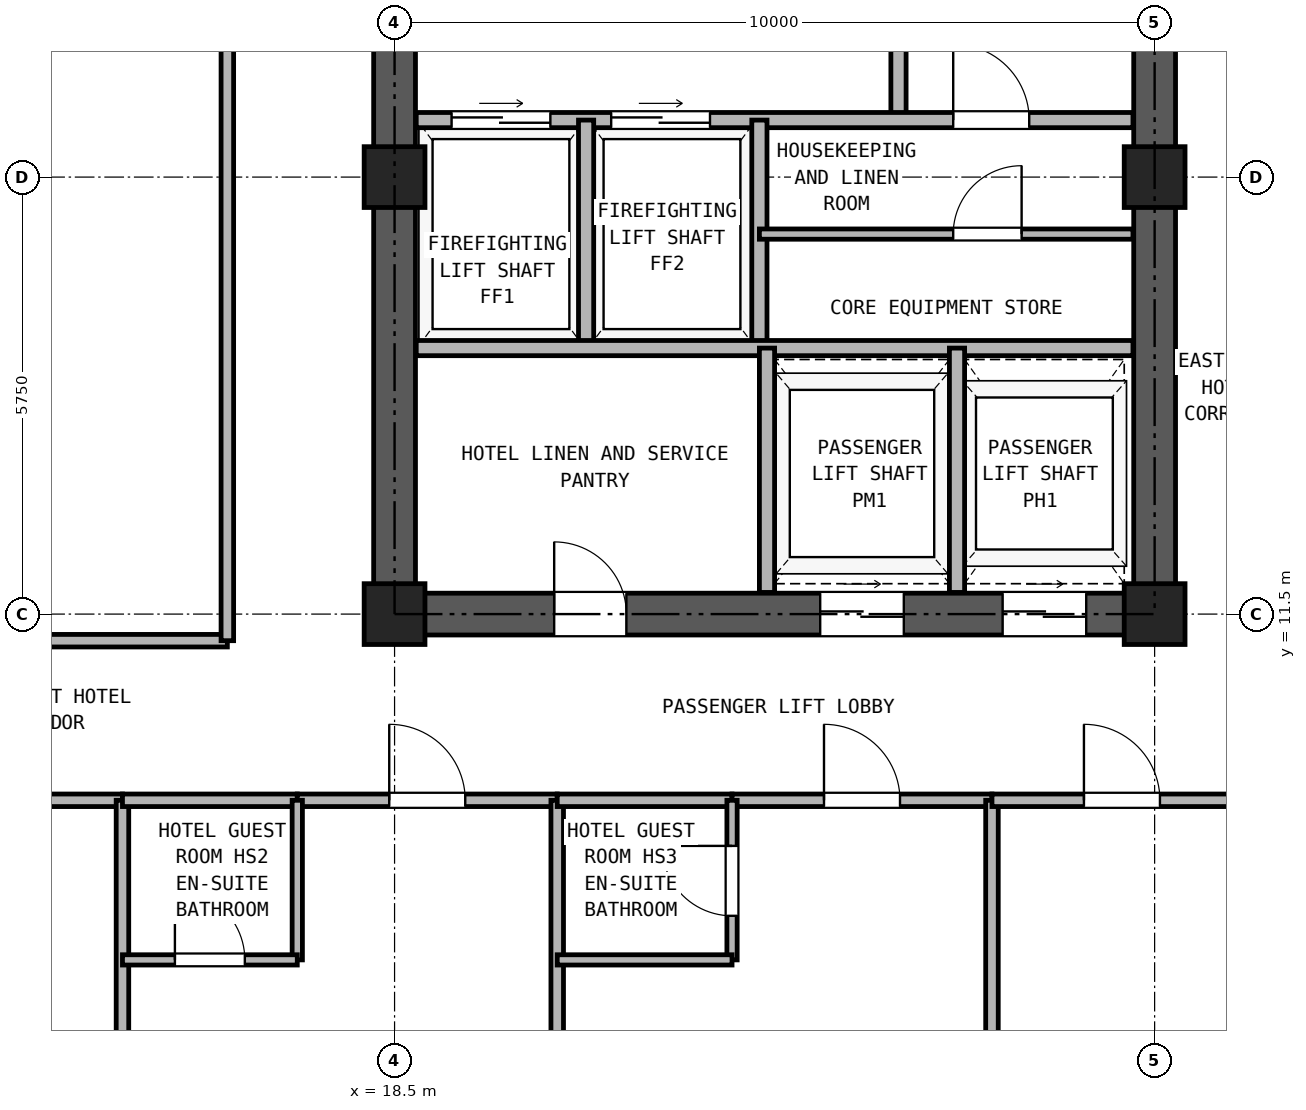
"""IFC4 building model, lengths in metres.
Left out: names, types, materials, properties, quantities, classifications, styles, units other than length and angle.
Written with IfcOpenShell. Run it as: python <this file> out.ifc"""

import sys

from ifc_helpers import new_model, si_unit, direction, frame, frame_2d, origin, origin_2d, place, context, subcontext, project, spatial, rectangle, hollow_rectangle, extrude, source, transform, mapped, element, fill, save


model = new_model("IFC4")
c1 = context("Model", 3, precision=1e-05, world=origin(), true_north=direction((0.0, 1.0)))
c2 = subcontext(c1, "Body", "Model", "MODEL_VIEW")
j1 = project(units=[si_unit("LENGTHUNIT", "METRE"), si_unit("PLANEANGLEUNIT", "RADIAN")], contexts=[c1])
p1 = place(None, origin())
s1 = spatial("IfcSite", under=j1, at=p1, CompositionType="ELEMENT")
p2 = place(p1, origin())
s2 = spatial("IfcBuilding", under=s1, at=p2, CompositionType="ELEMENT")
p3 = place(p2, frame((0.0, 0.0, 102.3)))
s3 = spatial("IfcBuildingStorey", under=s2, at=p3, CompositionType="ELEMENT", Elevation=102.3)
m1 = source(origin(), c2, "Body", "SweptSolid", [
    extrude(hollow_rectangle(XDim=0.8, YDim=0.8, WallThickness=0.045, at=origin_2d()), origin(), (0.0, 0.0, 1.0), 2.95),
])
for number, where, z_axis, x_axis in (
    (1, (18.5, 11.5, 0.0), (0.0, 0.0, 1.0), (1.0, 0.0, 0.0)),
    (2, (18.5, 17.25, 0.0), (0.0, 0.0, 1.0), (1.0, 0.0, 0.0)),
    (3, (28.5, 11.5, 0.0), (0.0, 0.0, 1.0), (1.0, 0.0, 0.0)),
    (4, (28.5, 17.25, 0.0), (0.0, 0.0, 1.0), (1.0, 0.0, 0.0)),
):
    element("IfcColumn", number, at=place(p3, frame(where, z_axis=z_axis, x_axis=x_axis)), inside=s3, PredefinedType="COLUMN", context=c2, shape_type="MappedRepresentation", body=[
        mapped(m1, transform((0.0, 0.0, 0.0), x_axis=(1.0, 0.0, 0.0), y_axis=(0.0, 1.0, 0.0), z_axis=(0.0, 0.0, 1.0), scale=1.0)),
    ])
p4 = place(p3, frame((18.225, 11.5, 0.0), z_axis=(0.0, 0.0, 1.0), x_axis=(1.0, 0.0, 0.0)))
e5 = element("IfcWall", 5, at=p4, inside=s3, PredefinedType="SHEAR", context=c2, shape_type="SweptSolid", body=[
    extrude(rectangle(XDim=10.55, YDim=0.55, at=frame_2d((5.275, 0.0))), origin(), (0.0, 0.0, 1.0), 2.95),
])
p5 = place(p4, frame((2.375, 0.0, 0.0)))
e6 = element("IfcOpeningElement", 6, at=p5, cuts=e5, PredefinedType="OPENING", context=c2, shape_type="SweptSolid", body=[
    extrude(rectangle(XDim=0.95, YDim=2.15, at=frame_2d((0.475, 1.075))), frame((0.0, 0.285, 0.0), z_axis=(0.0, -1.0, 0.0), x_axis=(1.0, 0.0, 0.0)), (0.0, 0.0, 1.0), 0.57),
])
p6 = place(p4, frame((5.875, 0.0, 0.0)))
e7 = element("IfcOpeningElement", 7, at=p6, cuts=e5, PredefinedType="OPENING", context=c2, shape_type="SweptSolid", body=[
    extrude(rectangle(XDim=1.1, YDim=2.25, at=frame_2d((0.55, 1.125))), frame((0.0, 0.285, 0.0), z_axis=(0.0, -1.0, 0.0), x_axis=(1.0, 0.0, 0.0)), (0.0, 0.0, 1.0), 0.57),
])
p7 = place(p4, frame((8.275, 0.0, 0.0)))
e8 = element("IfcOpeningElement", 8, at=p7, cuts=e5, PredefinedType="OPENING", context=c2, shape_type="SweptSolid", body=[
    extrude(rectangle(XDim=1.1, YDim=2.25, at=frame_2d((0.55, 1.125))), frame((0.0, 0.285, 0.0), z_axis=(0.0, -1.0, 0.0), x_axis=(1.0, 0.0, 0.0)), (0.0, 0.0, 1.0), 0.57),
])
p8 = place(p3, frame((18.5, 11.775, 0.0), z_axis=(0.0, 0.0, 1.0), x_axis=(0.0, 1.0, 0.0)))
e9 = element("IfcWall", 9, at=p8, inside=s3, PredefinedType="SHEAR", context=c2, shape_type="SweptSolid", body=[
    extrude(rectangle(XDim=16.7, YDim=0.55, at=frame_2d((8.35, 0.0))), origin(), (0.0, 0.0, 1.0), 2.95),
])
p9 = place(p8, frame((7.375, 0.0, 0.0)))
e10 = element("IfcOpeningElement", 10, at=p9, cuts=e9, PredefinedType="OPENING", context=c2, shape_type="SweptSolid", body=[
    extrude(rectangle(XDim=1.15, YDim=2.2, at=frame_2d((0.575, 1.1))), frame((0.0, 0.285, 0.0), z_axis=(0.0, -1.0, 0.0), x_axis=(1.0, 0.0, 0.0)), (0.0, 0.0, 1.0), 0.57),
])
p10 = place(p3, frame((28.5, 11.775, 0.0), z_axis=(0.0, 0.0, 1.0), x_axis=(0.0, 1.0, 0.0)))
e11 = element("IfcWall", 11, at=p10, inside=s3, PredefinedType="SHEAR", context=c2, shape_type="SweptSolid", body=[
    extrude(rectangle(XDim=16.7, YDim=0.55, at=frame_2d((8.35, 0.0))), origin(), (0.0, 0.0, 1.0), 2.95),
])
p11 = place(p10, frame((7.375, 0.0, 0.0)))
e12 = element("IfcOpeningElement", 12, at=p11, cuts=e11, PredefinedType="OPENING", context=c2, shape_type="SweptSolid", body=[
    extrude(rectangle(XDim=1.15, YDim=2.2, at=frame_2d((0.575, 1.1))), frame((0.0, 0.285, 0.0), z_axis=(0.0, -1.0, 0.0), x_axis=(1.0, 0.0, 0.0)), (0.0, 0.0, 1.0), 0.57),
])
p12 = place(p3, frame((25.13, 18.0, 0.0), z_axis=(0.0, 0.0, 1.0), x_axis=(0.0, 1.0, 0.0)))
e13 = element("IfcWall", 13, at=p12, inside=s3, PredefinedType="PARTITIONING", context=c2, shape_type="SweptSolid", body=[
    extrude(rectangle(XDim=3.39, YDim=0.2, at=frame_2d((1.695, 0.0))), origin(), (0.0, 0.0, 1.0), 2.95),
])
p13 = place(p12, frame((1.1, 0.0, 0.0)))
e14 = element("IfcOpeningElement", 14, at=p13, cuts=e13, PredefinedType="OPENING", context=c2, shape_type="SweptSolid", body=[
    extrude(rectangle(XDim=1.15, YDim=2.2, at=frame_2d((0.575, 1.1))), frame((0.0, 0.11, 0.0), z_axis=(0.0, -1.0, 0.0), x_axis=(1.0, 0.0, 0.0)), (0.0, 0.0, 1.0), 0.22),
])
p14 = place(p3, frame((18.785, 18.0, 0.0), z_axis=(0.0, 0.0, 1.0), x_axis=(1.0, 0.0, 0.0)))
e15 = element("IfcWall", 15, at=p14, inside=s3, PredefinedType="PARTITIONING", context=c2, shape_type="SweptSolid", body=[
    extrude(rectangle(XDim=9.43, YDim=0.2, at=frame_2d((4.715, 0.0))), origin(), (0.0, 0.0, 1.0), 2.95),
])
p15 = place(p14, frame((0.465, 0.0, 0.0)))
e16 = element("IfcOpeningElement", 16, at=p15, cuts=e15, PredefinedType="OPENING", context=c2, shape_type="SweptSolid", body=[
    extrude(rectangle(XDim=1.3, YDim=2.3, at=frame_2d((0.65, 1.15))), frame((0.0, 0.11, 0.0), z_axis=(0.0, -1.0, 0.0), x_axis=(1.0, 0.0, 0.0)), (0.0, 0.0, 1.0), 0.22),
])
p16 = place(p14, frame((2.565, 0.0, 0.0)))
e17 = element("IfcOpeningElement", 17, at=p16, cuts=e15, PredefinedType="OPENING", context=c2, shape_type="SweptSolid", body=[
    extrude(rectangle(XDim=1.3, YDim=2.3, at=frame_2d((0.65, 1.15))), frame((0.0, 0.11, 0.0), z_axis=(0.0, -1.0, 0.0), x_axis=(1.0, 0.0, 0.0)), (0.0, 0.0, 1.0), 0.22),
])
p17 = place(p14, frame((7.065, 0.0, 0.0)))
e18 = element("IfcOpeningElement", 18, at=p17, cuts=e15, PredefinedType="OPENING", context=c2, shape_type="SweptSolid", body=[
    extrude(rectangle(XDim=1.0, YDim=2.15, at=frame_2d((0.5, 1.075))), frame((0.0, 0.11, 0.0), z_axis=(0.0, -1.0, 0.0), x_axis=(1.0, 0.0, 0.0)), (0.0, 0.0, 1.0), 0.22),
])
for number, where, z_axis, x_axis in (
    (19, (21.02, 15.0, 0.0), (0.0, 0.0, 1.0), (0.0, 1.0, 0.0)),
    (20, (23.3, 15.0, 0.0), (0.0, 0.0, 1.0), (0.0, 1.0, 0.0)),
):
    element("IfcWall", number, at=place(p3, frame(where, z_axis=z_axis, x_axis=x_axis)), inside=s3, PredefinedType="PARTITIONING", context=c2, shape_type="SweptSolid", body=[
        extrude(rectangle(XDim=3.0, YDim=0.2, at=frame_2d((1.5, 0.0))), origin(), (0.0, 0.0, 1.0), 2.95),
    ])
p18 = place(p3, frame((18.785, 15.0, 0.0), z_axis=(0.0, 0.0, 1.0), x_axis=(1.0, 0.0, 0.0)))
e21 = element("IfcWall", 21, at=p18, inside=s3, PredefinedType="PARTITIONING", context=c2, shape_type="SweptSolid", body=[
    extrude(rectangle(XDim=9.43, YDim=0.2, at=frame_2d((4.715, 0.0))), origin(), (0.0, 0.0, 1.0), 2.95),
])
p19 = place(p3, frame((23.3, 16.5, 0.0), z_axis=(0.0, 0.0, 1.0), x_axis=(1.0, 0.0, 0.0)))
e22 = element("IfcWall", 22, at=p19, inside=s3, PredefinedType="PARTITIONING", context=c2, shape_type="SweptSolid", body=[
    extrude(rectangle(XDim=4.915, YDim=0.135, at=frame_2d((2.458, 0.0))), origin(), (0.0, 0.0, 1.0), 2.95),
])
p20 = place(p19, frame((2.55, 0.0, 0.0)))
e23 = element("IfcOpeningElement", 23, at=p20, cuts=e22, PredefinedType="OPENING", context=c2, shape_type="SweptSolid", body=[
    extrude(rectangle(XDim=0.9, YDim=2.05, at=frame_2d((0.45, 1.025))), frame((0.0, 0.077, 0.0), z_axis=(0.0, -1.0, 0.0), x_axis=(1.0, 0.0, 0.0)), (0.0, 0.0, 1.0), 0.155),
])
for number, where, z_axis, x_axis in (
    (24, (23.4, 11.785, 0.0), (0.0, 0.0, 1.0), (0.0, 1.0, 0.0)),
    (25, (25.9, 11.785, 0.0), (0.0, 0.0, 1.0), (0.0, 1.0, 0.0)),
):
    element("IfcWall", number, at=place(p3, frame(where, z_axis=z_axis, x_axis=x_axis)), inside=s3, PredefinedType="PARTITIONING", context=c2, shape_type="SweptSolid", body=[
        extrude(rectangle(XDim=3.215, YDim=0.2, at=frame_2d((1.607, 0.0))), origin(), (0.0, 0.0, 1.0), 2.95),
    ])
p21 = place(p3, frame((9.2, 11.15, 0.0), z_axis=(0.0, 0.0, 1.0), x_axis=(1.0, 0.0, 0.0)))
e26 = element("IfcWall", 26, at=p21, inside=s3, PredefinedType="PARTITIONING", context=c2, shape_type="SweptSolid", body=[
    extrude(rectangle(XDim=7.1, YDim=0.165, at=frame_2d((3.55, 0.0))), origin(), (0.0, 0.0, 1.0), 2.95),
])
p22 = place(p3, frame((16.3, 11.15, 0.0), z_axis=(0.0, 0.0, 1.0), x_axis=(0.0, 1.0, 0.0)))
e27 = element("IfcWall", 27, at=p22, inside=s3, PredefinedType="PARTITIONING", context=c2, shape_type="SweptSolid", body=[
    extrude(rectangle(XDim=18.6, YDim=0.165, at=frame_2d((9.3, 0.0))), origin(), (0.0, 0.0, 1.0), 2.95),
])
p23 = place(p22, frame((8.8, 0.0, 0.0)))
e28 = element("IfcOpeningElement", 28, at=p23, cuts=e27, PredefinedType="OPENING", context=c2, shape_type="SweptSolid", body=[
    extrude(rectangle(XDim=0.95, YDim=2.15, at=frame_2d((0.475, 1.075))), frame((0.0, 0.093, 0.0), z_axis=(0.0, -1.0, 0.0), x_axis=(1.0, 0.0, 0.0)), (0.0, 0.0, 1.0), 0.185),
])
p24 = place(p3, frame((11.5, 9.05, 0.0), z_axis=(0.0, 0.0, 1.0), x_axis=(1.0, 0.0, 0.0)))
e29 = element("IfcWall", 29, at=p24, inside=s3, PredefinedType="PARTITIONING", context=c2, shape_type="SweptSolid", body=[
    extrude(rectangle(XDim=3.42, YDim=0.165, at=frame_2d((1.71, 0.0))), origin(), (0.0, 0.0, 1.0), 2.95),
])
p25 = place(p24, frame((1.21, 0.0, 0.0)))
e30 = element("IfcOpeningElement", 30, at=p25, cuts=e29, PredefinedType="OPENING", context=c2, shape_type="SweptSolid", body=[
    extrude(rectangle(XDim=1.0, YDim=2.15, at=frame_2d((0.5, 1.075))), frame((0.0, 0.093, 0.0), z_axis=(0.0, -1.0, 0.0), x_axis=(1.0, 0.0, 0.0)), (0.0, 0.0, 1.0), 0.185),
])
p26 = place(p3, frame((14.92, 0.16, 0.0), z_axis=(0.0, 0.0, 1.0), x_axis=(0.0, 1.0, 0.0)))
e31 = element("IfcWall", 31, at=p26, inside=s3, PredefinedType="PARTITIONING", context=c2, shape_type="SweptSolid", body=[
    extrude(rectangle(XDim=8.89, YDim=0.165, at=frame_2d((4.445, 0.0))), origin(), (0.0, 0.0, 1.0), 2.95),
])
p27 = place(p3, frame((14.92, 9.05, 0.0), z_axis=(0.0, 0.0, 1.0), x_axis=(1.0, 0.0, 0.0)))
e32 = element("IfcWall", 32, at=p27, inside=s3, PredefinedType="PARTITIONING", context=c2, shape_type="SweptSolid", body=[
    extrude(rectangle(XDim=2.3, YDim=0.165, at=frame_2d((1.15, 0.0))), origin(), (0.0, 0.0, 1.0), 2.95),
])
p28 = place(p3, frame((17.22, 9.05, 0.0), z_axis=(0.0, 0.0, 1.0), x_axis=(1.0, 0.0, 0.0)))
e33 = element("IfcWall", 33, at=p28, inside=s3, PredefinedType="PARTITIONING", context=c2, shape_type="SweptSolid", body=[
    extrude(rectangle(XDim=3.42, YDim=0.165, at=frame_2d((1.71, 0.0))), origin(), (0.0, 0.0, 1.0), 2.95),
])
p29 = place(p28, frame((1.21, 0.0, 0.0)))
e34 = element("IfcOpeningElement", 34, at=p29, cuts=e33, PredefinedType="OPENING", context=c2, shape_type="SweptSolid", body=[
    extrude(rectangle(XDim=1.0, YDim=2.15, at=frame_2d((0.5, 1.075))), frame((0.0, 0.093, 0.0), z_axis=(0.0, -1.0, 0.0), x_axis=(1.0, 0.0, 0.0)), (0.0, 0.0, 1.0), 0.185),
])
p30 = place(p3, frame((17.22, 6.95, 0.0), z_axis=(0.0, 0.0, 1.0), x_axis=(0.0, 1.0, 0.0)))
e35 = element("IfcWall", 35, at=p30, inside=s3, PredefinedType="PARTITIONING", context=c2, shape_type="SweptSolid", body=[
    extrude(rectangle(XDim=2.1, YDim=0.135, at=frame_2d((1.05, 0.0))), origin(), (0.0, 0.0, 1.0), 2.95),
])
p31 = place(p3, frame((14.92, 6.95, 0.0), z_axis=(0.0, 0.0, 1.0), x_axis=(1.0, 0.0, 0.0)))
e36 = element("IfcWall", 36, at=p31, inside=s3, PredefinedType="PARTITIONING", context=c2, shape_type="SweptSolid", body=[
    extrude(rectangle(XDim=2.3, YDim=0.135, at=frame_2d((1.15, 0.0))), origin(), (0.0, 0.0, 1.0), 2.95),
])
p32 = place(p31, frame((0.69, 0.0, 0.0)))
e37 = element("IfcOpeningElement", 37, at=p32, cuts=e36, PredefinedType="OPENING", context=c2, shape_type="SweptSolid", body=[
    extrude(rectangle(XDim=0.92, YDim=2.1, at=frame_2d((0.46, 1.05))), frame((0.0, 0.077, 0.0), z_axis=(0.0, -1.0, 0.0), x_axis=(1.0, 0.0, 0.0)), (0.0, 0.0, 1.0), 0.155),
])
p33 = place(p3, frame((20.64, 0.16, 0.0), z_axis=(0.0, 0.0, 1.0), x_axis=(0.0, 1.0, 0.0)))
e38 = element("IfcWall", 38, at=p33, inside=s3, PredefinedType="PARTITIONING", context=c2, shape_type="SweptSolid", body=[
    extrude(rectangle(XDim=8.89, YDim=0.165, at=frame_2d((4.445, 0.0))), origin(), (0.0, 0.0, 1.0), 2.95),
])
p34 = place(p3, frame((20.64, 9.05, 0.0), z_axis=(0.0, 0.0, 1.0), x_axis=(1.0, 0.0, 0.0)))
e39 = element("IfcWall", 39, at=p34, inside=s3, PredefinedType="PARTITIONING", context=c2, shape_type="SweptSolid", body=[
    extrude(rectangle(XDim=2.3, YDim=0.165, at=frame_2d((1.15, 0.0))), origin(), (0.0, 0.0, 1.0), 2.95),
])
p35 = place(p3, frame((22.94, 9.05, 0.0), z_axis=(0.0, 0.0, 1.0), x_axis=(1.0, 0.0, 0.0)))
e40 = element("IfcWall", 40, at=p35, inside=s3, PredefinedType="PARTITIONING", context=c2, shape_type="SweptSolid", body=[
    extrude(rectangle(XDim=3.42, YDim=0.165, at=frame_2d((1.71, 0.0))), origin(), (0.0, 0.0, 1.0), 2.95),
])
p36 = place(p35, frame((1.21, 0.0, 0.0)))
e41 = element("IfcOpeningElement", 41, at=p36, cuts=e40, PredefinedType="OPENING", context=c2, shape_type="SweptSolid", body=[
    extrude(rectangle(XDim=1.0, YDim=2.15, at=frame_2d((0.5, 1.075))), frame((0.0, 0.093, 0.0), z_axis=(0.0, -1.0, 0.0), x_axis=(1.0, 0.0, 0.0)), (0.0, 0.0, 1.0), 0.185),
])
p37 = place(p3, frame((22.94, 6.95, 0.0), z_axis=(0.0, 0.0, 1.0), x_axis=(0.0, 1.0, 0.0)))
e42 = element("IfcWall", 42, at=p37, inside=s3, PredefinedType="PARTITIONING", context=c2, shape_type="SweptSolid", body=[
    extrude(rectangle(XDim=2.1, YDim=0.135, at=frame_2d((1.05, 0.0))), origin(), (0.0, 0.0, 1.0), 2.95),
])
p38 = place(p37, frame((0.58, 0.0, 0.0)))
e43 = element("IfcOpeningElement", 43, at=p38, cuts=e42, PredefinedType="OPENING", context=c2, shape_type="SweptSolid", body=[
    extrude(rectangle(XDim=0.92, YDim=2.1, at=frame_2d((0.46, 1.05))), frame((0.0, 0.077, 0.0), z_axis=(0.0, -1.0, 0.0), x_axis=(1.0, 0.0, 0.0)), (0.0, 0.0, 1.0), 0.155),
])
p39 = place(p3, frame((20.64, 6.95, 0.0), z_axis=(0.0, 0.0, 1.0), x_axis=(1.0, 0.0, 0.0)))
e44 = element("IfcWall", 44, at=p39, inside=s3, PredefinedType="PARTITIONING", context=c2, shape_type="SweptSolid", body=[
    extrude(rectangle(XDim=2.3, YDim=0.135, at=frame_2d((1.15, 0.0))), origin(), (0.0, 0.0, 1.0), 2.95),
])
p40 = place(p3, frame((26.36, 0.16, 0.0), z_axis=(0.0, 0.0, 1.0), x_axis=(0.0, 1.0, 0.0)))
e45 = element("IfcWall", 45, at=p40, inside=s3, PredefinedType="PARTITIONING", context=c2, shape_type="SweptSolid", body=[
    extrude(rectangle(XDim=8.89, YDim=0.165, at=frame_2d((4.445, 0.0))), origin(), (0.0, 0.0, 1.0), 2.95),
])
p41 = place(p3, frame((26.36, 9.05, 0.0), z_axis=(0.0, 0.0, 1.0), x_axis=(1.0, 0.0, 0.0)))
e46 = element("IfcWall", 46, at=p41, inside=s3, PredefinedType="PARTITIONING", context=c2, shape_type="SweptSolid", body=[
    extrude(rectangle(XDim=3.42, YDim=0.165, at=frame_2d((1.71, 0.0))), origin(), (0.0, 0.0, 1.0), 2.95),
])
p42 = place(p41, frame((1.21, 0.0, 0.0)))
e47 = element("IfcOpeningElement", 47, at=p42, cuts=e46, PredefinedType="OPENING", context=c2, shape_type="SweptSolid", body=[
    extrude(rectangle(XDim=1.0, YDim=2.15, at=frame_2d((0.5, 1.075))), frame((0.0, 0.093, 0.0), z_axis=(0.0, -1.0, 0.0), x_axis=(1.0, 0.0, 0.0)), (0.0, 0.0, 1.0), 0.185),
])
p43 = place(p15, origin())
e48 = element("IfcDoor", 48, at=p43, inside=s3, OperationType="DOUBLE_DOOR_SLIDING", PredefinedType="DOOR", context=c2, shape_type="SweptSolid", body=[
    extrude(rectangle(XDim=1.3, YDim=2.3, at=frame_2d((0.65, 1.15))), frame((0.0, 0.025, 0.0), z_axis=(0.0, -1.0, 0.0), x_axis=(1.0, 0.0, 0.0)), (0.0, 0.0, 1.0), 0.05),
])
fill(e16, e48)
p44 = place(p16, origin())
e49 = element("IfcDoor", 49, at=p44, inside=s3, OperationType="DOUBLE_DOOR_SLIDING", PredefinedType="DOOR", context=c2, shape_type="SweptSolid", body=[
    extrude(rectangle(XDim=1.3, YDim=2.3, at=frame_2d((0.65, 1.15))), frame((0.0, 0.025, 0.0), z_axis=(0.0, -1.0, 0.0), x_axis=(1.0, 0.0, 0.0)), (0.0, 0.0, 1.0), 0.05),
])
fill(e17, e49)
p45 = place(p17, frame((1.0, 0.0, 0.0), z_axis=(0.0, 0.0, 1.0), x_axis=(-1.0, 0.0, 0.0)))
e50 = element("IfcDoor", 50, at=p45, inside=s3, OperationType="SINGLE_SWING_LEFT", PredefinedType="DOOR", context=c2, shape_type="SweptSolid", body=[
    extrude(rectangle(XDim=1.0, YDim=2.15, at=frame_2d((0.5, 1.075))), frame((0.0, 0.025, 0.0), z_axis=(0.0, -1.0, 0.0), x_axis=(1.0, 0.0, 0.0)), (0.0, 0.0, 1.0), 0.05),
])
fill(e18, e50)
p46 = place(p20, frame((0.9, 0.0, 0.0), z_axis=(0.0, 0.0, 1.0), x_axis=(-1.0, 0.0, 0.0)))
e51 = element("IfcDoor", 51, at=p46, inside=s3, OperationType="SINGLE_SWING_RIGHT", PredefinedType="DOOR", context=c2, shape_type="SweptSolid", body=[
    extrude(rectangle(XDim=0.9, YDim=2.05, at=frame_2d((0.45, 1.025))), frame((0.0, 0.025, 0.0), z_axis=(0.0, -1.0, 0.0), x_axis=(1.0, 0.0, 0.0)), (0.0, 0.0, 1.0), 0.05),
])
fill(e23, e51)
p47 = place(p5, frame((0.95, 0.0, 0.0), z_axis=(0.0, 0.0, 1.0), x_axis=(-1.0, 0.0, 0.0)))
e52 = element("IfcDoor", 52, at=p47, inside=s3, OperationType="SINGLE_SWING_LEFT", PredefinedType="DOOR", context=c2, shape_type="SweptSolid", body=[
    extrude(rectangle(XDim=0.95, YDim=2.15, at=frame_2d((0.475, 1.075))), frame((0.0, 0.025, 0.0), z_axis=(0.0, -1.0, 0.0), x_axis=(1.0, 0.0, 0.0)), (0.0, 0.0, 1.0), 0.05),
])
fill(e6, e52)
p48 = place(p6, frame((1.1, 0.0, 0.0), z_axis=(0.0, 0.0, 1.0), x_axis=(-1.0, 0.0, 0.0)))
e53 = element("IfcDoor", 53, at=p48, inside=s3, OperationType="DOUBLE_DOOR_SLIDING", PredefinedType="DOOR", context=c2, shape_type="SweptSolid", body=[
    extrude(rectangle(XDim=1.1, YDim=2.25, at=frame_2d((0.55, 1.125))), frame((0.0, 0.025, 0.0), z_axis=(0.0, -1.0, 0.0), x_axis=(1.0, 0.0, 0.0)), (0.0, 0.0, 1.0), 0.05),
])
fill(e7, e53)
p49 = place(p7, frame((1.1, 0.0, 0.0), z_axis=(0.0, 0.0, 1.0), x_axis=(-1.0, 0.0, 0.0)))
e54 = element("IfcDoor", 54, at=p49, inside=s3, OperationType="DOUBLE_DOOR_SLIDING", PredefinedType="DOOR", context=c2, shape_type="SweptSolid", body=[
    extrude(rectangle(XDim=1.1, YDim=2.25, at=frame_2d((0.55, 1.125))), frame((0.0, 0.025, 0.0), z_axis=(0.0, -1.0, 0.0), x_axis=(1.0, 0.0, 0.0)), (0.0, 0.0, 1.0), 0.05),
])
fill(e8, e54)
p50 = place(p32, origin())
e55 = element("IfcDoor", 55, at=p50, inside=s3, OperationType="SINGLE_SWING_LEFT", PredefinedType="DOOR", context=c2, shape_type="SweptSolid", body=[
    extrude(rectangle(XDim=0.92, YDim=2.1, at=frame_2d((0.46, 1.05))), frame((0.0, 0.025, 0.0), z_axis=(0.0, -1.0, 0.0), x_axis=(1.0, 0.0, 0.0)), (0.0, 0.0, 1.0), 0.05),
])
fill(e37, e55)
p51 = place(p29, frame((1.0, 0.0, 0.0), z_axis=(0.0, 0.0, 1.0), x_axis=(-1.0, 0.0, 0.0)))
e56 = element("IfcDoor", 56, at=p51, inside=s3, OperationType="SINGLE_SWING_LEFT", PredefinedType="DOOR", context=c2, shape_type="SweptSolid", body=[
    extrude(rectangle(XDim=1.0, YDim=2.15, at=frame_2d((0.5, 1.075))), frame((0.0, 0.025, 0.0), z_axis=(0.0, -1.0, 0.0), x_axis=(1.0, 0.0, 0.0)), (0.0, 0.0, 1.0), 0.05),
])
fill(e34, e56)
p52 = place(p38, frame((0.92, 0.0, 0.0), z_axis=(0.0, 0.0, 1.0), x_axis=(-1.0, 0.0, 0.0)))
e57 = element("IfcDoor", 57, at=p52, inside=s3, OperationType="SINGLE_SWING_RIGHT", PredefinedType="DOOR", context=c2, shape_type="SweptSolid", body=[
    extrude(rectangle(XDim=0.92, YDim=2.1, at=frame_2d((0.46, 1.05))), frame((0.0, 0.025, 0.0), z_axis=(0.0, -1.0, 0.0), x_axis=(1.0, 0.0, 0.0)), (0.0, 0.0, 1.0), 0.05),
])
fill(e43, e57)
p53 = place(p36, frame((1.0, 0.0, 0.0), z_axis=(0.0, 0.0, 1.0), x_axis=(-1.0, 0.0, 0.0)))
e58 = element("IfcDoor", 58, at=p53, inside=s3, OperationType="SINGLE_SWING_LEFT", PredefinedType="DOOR", context=c2, shape_type="SweptSolid", body=[
    extrude(rectangle(XDim=1.0, YDim=2.15, at=frame_2d((0.5, 1.075))), frame((0.0, 0.025, 0.0), z_axis=(0.0, -1.0, 0.0), x_axis=(1.0, 0.0, 0.0)), (0.0, 0.0, 1.0), 0.05),
])
fill(e41, e58)
p54 = place(p42, frame((1.0, 0.0, 0.0), z_axis=(0.0, 0.0, 1.0), x_axis=(-1.0, 0.0, 0.0)))
e59 = element("IfcDoor", 59, at=p54, inside=s3, OperationType="SINGLE_SWING_LEFT", PredefinedType="DOOR", context=c2, shape_type="SweptSolid", body=[
    extrude(rectangle(XDim=1.0, YDim=2.15, at=frame_2d((0.5, 1.075))), frame((0.0, 0.025, 0.0), z_axis=(0.0, -1.0, 0.0), x_axis=(1.0, 0.0, 0.0)), (0.0, 0.0, 1.0), 0.05),
])
fill(e47, e59)
save(model, sys.argv[1])
